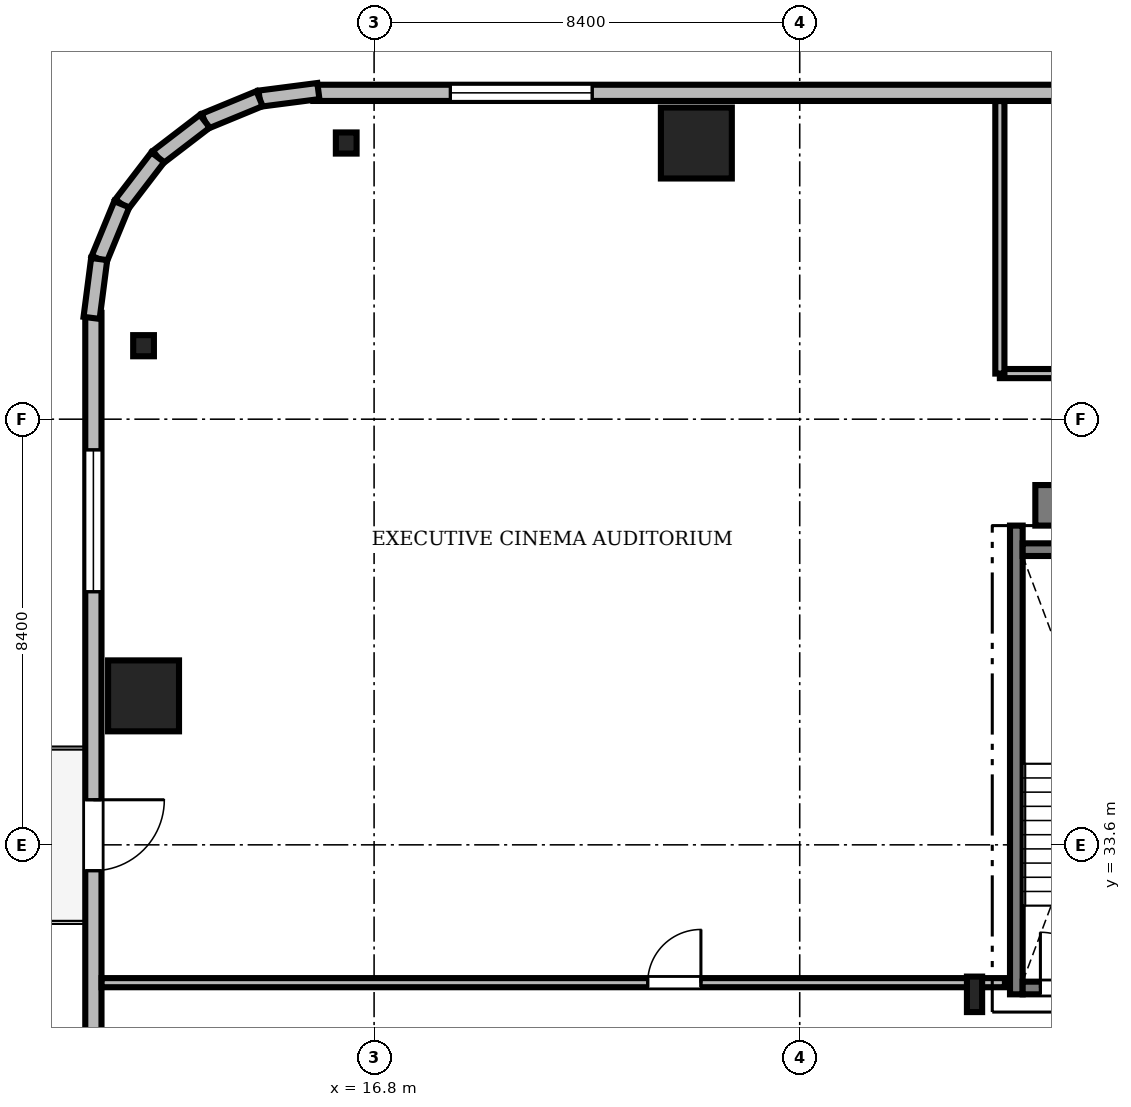
"""IFC4 building model, lengths in metres.
Left out: names, types, materials, properties, quantities, classifications, styles, units other than length and angle.
Written with IfcOpenShell. Run it as: python <this file> out.ifc"""

import sys

from ifc_helpers import new_model, si_unit, direction, frame, frame_2d, origin, origin_2d, place, context, subcontext, project, spatial, rectangle, i_section, extrude, source, transform, mapped, element, fill, save


model = new_model("IFC4")
c1 = context("Model", 3, precision=1e-05, world=origin(), true_north=direction((0.0, 1.0)))
c2 = subcontext(c1, "Body", "Model", "MODEL_VIEW")
j1 = project(units=[si_unit("LENGTHUNIT", "METRE"), si_unit("PLANEANGLEUNIT", "RADIAN")], contexts=[c1])
p1 = place(None, origin())
s1 = spatial("IfcSite", under=j1, at=p1, CompositionType="ELEMENT")
p2 = place(p1, origin())
s2 = spatial("IfcBuilding", under=s1, at=p2, CompositionType="ELEMENT")
p3 = place(p2, frame((0.0, 0.0, 181.0)))
s3 = spatial("IfcBuildingStorey", under=s2, at=p3, CompositionType="ELEMENT", Elevation=181.0)
m1 = source(origin(), c2, "Body", "SweptSolid", [
    extrude(rectangle(XDim=17.52, YDim=0.8, at=frame_2d((8.76, 0.0))), origin(), (0.0, 0.0, 1.0), 3.58),
])
p4 = place(p3, frame((29.85, 40.3, 0.0), z_axis=(0.0, 0.0, 1.0), x_axis=(1.0, 0.0, 0.0)))
e1 = element("IfcWall", 1, at=p4, inside=s3, PredefinedType="SHEAR", context=c2, shape_type="MappedRepresentation", body=[
    mapped(m1, transform((0.0, 0.0, 0.0), scale=1.0)),
])
m2 = source(origin(), c2, "Body", "SweptSolid", [
    extrude(i_section(OverallWidth=0.3, OverallDepth=0.7, WebThickness=0.017, FlangeThickness=0.032, FilletRadius=0.027, at=origin_2d()), origin(), (0.0, 0.0, 1.0), 3.58),
])
p5 = place(p3, frame((28.65, 30.65, 0.0), z_axis=(0.0, 0.0, 1.0), x_axis=(1.0, 0.0, 0.0)))
e2 = element("IfcColumn", 2, at=p5, inside=s3, PredefinedType="COLUMN", context=c2, shape_type="MappedRepresentation", body=[
    mapped(m2, transform((0.0, 0.0, 0.0), scale=1.0)),
])
m3 = source(origin(), c2, "Body", "SweptSolid", [
    extrude(rectangle(XDim=1.4, YDim=1.4, at=origin_2d()), origin(), (0.0, 0.0, 1.0), 3.58),
])
for number, where, z_axis, x_axis in (
    (3, (23.16, 47.45, 0.0), (0.0, 0.0, 1.0), (1.0, 0.0, 0.0)),
    (4, (12.25, 36.54, 0.0), (0.0, 0.0, 1.0), (1.0, 0.0, 0.0)),
):
    element("IfcColumn", number, at=place(p3, frame(where, z_axis=z_axis, x_axis=x_axis)), inside=s3, PredefinedType="COLUMN", context=c2, shape_type="MappedRepresentation", body=[
        mapped(m3, transform((0.0, 0.0, 0.0), scale=1.0)),
    ])
m4 = source(origin(), c2, "Body", "SweptSolid", [
    extrude(i_section(OverallWidth=0.409, OverallDepth=0.417, WebThickness=0.021, FlangeThickness=0.033, FilletRadius=0.015, at=origin_2d()), origin(), (0.0, 0.0, 1.0), 3.58),
])
for number, where, z_axis, x_axis in (
    (5, (16.25, 47.45, 0.0), (0.0, 0.0, 1.0), (1.0, 0.0, 0.0)),
    (6, (12.25, 43.45, 0.0), (0.0, 0.0, 1.0), (1.0, 0.0, 0.0)),
):
    element("IfcColumn", number, at=place(p3, frame(where, z_axis=z_axis, x_axis=x_axis)), inside=s3, PredefinedType="COLUMN", context=c2, shape_type="MappedRepresentation", body=[
        mapped(m4, transform((0.0, 0.0, 0.0), scale=1.0)),
    ])
m5 = source(origin(), c2, "Body", "SweptSolid", [
    extrude(rectangle(XDim=15.6, YDim=0.32, at=frame_2d((7.8, 0.0))), origin(), (0.0, 0.0, 1.0), 3.58),
])
p6 = place(p3, frame((31.2, 48.44, 0.0), z_axis=(0.0, 0.0, 1.0), x_axis=(-1.0, 0.0, 0.0)))
e7 = element("IfcWall", 7, at=p6, inside=s3, PredefinedType="SOLIDWALL", context=c2, shape_type="MappedRepresentation", body=[
    mapped(m5, transform((0.0, 0.0, 0.0), scale=1.0)),
])
m6 = source(origin(), c2, "Body", "SweptSolid", [
    extrude(rectangle(XDim=2.8, YDim=2.4, at=frame_2d((1.4, 1.2))), frame((0.0, 0.17, 0.0), z_axis=(0.0, -1.0, 0.0), x_axis=(1.0, 0.0, 0.0)), (0.0, 0.0, 1.0), 0.34),
])
p7 = place(p6, frame((10.095, 0.0, 0.72)))
e8 = element("IfcOpeningElement", 8, at=p7, cuts=e7, PredefinedType="OPENING", context=c2, shape_type="MappedRepresentation", body=[
    mapped(m6, transform((0.0, 0.0, 0.0), scale=1.0)),
])
m7 = source(origin(), c2, "Body", "SweptSolid", [
    extrude(rectangle(XDim=15.6, YDim=0.32, at=frame_2d((7.8, 0.0))), origin(), (0.0, 0.0, 1.0), 3.58),
])
p8 = place(p3, frame((11.26, 44.1, 0.0), z_axis=(0.0, 0.0, 1.0), x_axis=(0.0, -1.0, 0.0)))
e9 = element("IfcWall", 9, at=p8, inside=s3, PredefinedType="SOLIDWALL", context=c2, shape_type="MappedRepresentation", body=[
    mapped(m7, transform((0.0, 0.0, 0.0), scale=1.0)),
])
m8 = source(origin(), c2, "Body", "SweptSolid", [
    extrude(rectangle(XDim=1.4, YDim=2.3, at=frame_2d((0.7, 1.15))), frame((0.0, 0.17, 0.0), z_axis=(0.0, -1.0, 0.0), x_axis=(1.0, 0.0, 0.0)), (0.0, 0.0, 1.0), 0.34),
])
p9 = place(p8, frame((9.61, 0.0, 0.0)))
e10 = element("IfcOpeningElement", 10, at=p9, cuts=e9, PredefinedType="OPENING", context=c2, shape_type="MappedRepresentation", body=[
    mapped(m8, transform((0.0, 0.0, 0.0), scale=1.0)),
])
p10 = place(p8, frame((2.705, 0.0, 0.72)))
e11 = element("IfcOpeningElement", 11, at=p10, cuts=e9, PredefinedType="OPENING", context=c2, shape_type="MappedRepresentation", body=[
    mapped(m6, transform((0.0, 0.0, 0.0), scale=1.0)),
])
m9 = source(origin(), c2, "Body", "SweptSolid", [
    extrude(rectangle(XDim=1.17, YDim=0.32, at=frame_2d((0.585, 0.0))), origin(), (0.0, 0.0, 1.0), 3.58),
])
p11 = place(p3, frame((15.7, 48.476, 0.0), z_axis=(0.0, 0.0, 1.0), x_axis=(-0.991735963317, -0.128295670475, 0.0)))
e12 = element("IfcWall", 12, at=p11, inside=s3, PredefinedType="SOLIDWALL", context=c2, shape_type="MappedRepresentation", body=[
    mapped(m9, transform((0.0, 0.0, 0.0), scale=1.0)),
])
m10 = source(origin(), c2, "Body", "SweptSolid", [
    extrude(rectangle(XDim=1.169, YDim=0.32, at=frame_2d((0.584, 0.0))), origin(), (0.0, 0.0, 1.0), 3.58),
])
p12 = place(p3, frame((14.54, 48.325, 0.0), z_axis=(0.0, 0.0, 1.0), x_axis=(-0.924552646638, -0.381054331552, 0.0)))
e13 = element("IfcWall", 13, at=p12, inside=s3, PredefinedType="SOLIDWALL", context=c2, shape_type="MappedRepresentation", body=[
    mapped(m10, transform((0.0, 0.0, 0.0), scale=1.0)),
])
m11 = source(origin(), c2, "Body", "SweptSolid", [
    extrude(rectangle(XDim=1.169, YDim=0.32, at=frame_2d((0.584, 0.0))), origin(), (0.0, 0.0, 1.0), 3.58),
])
p13 = place(p3, frame((13.459, 47.88, 0.0), z_axis=(0.0, 0.0, 1.0), x_axis=(-0.793663520347, -0.608356981114, 0.0)))
e14 = element("IfcWall", 14, at=p13, inside=s3, PredefinedType="SOLIDWALL", context=c2, shape_type="MappedRepresentation", body=[
    mapped(m11, transform((0.0, 0.0, 0.0), scale=1.0)),
])
m12 = source(origin(), c2, "Body", "SweptSolid", [
    extrude(rectangle(XDim=1.169, YDim=0.32, at=frame_2d((0.584, 0.0))), origin(), (0.0, 0.0, 1.0), 3.58),
])
p14 = place(p3, frame((12.531, 47.169, 0.0), z_axis=(0.0, 0.0, 1.0), x_axis=(-0.608387696831, -0.793639975269, 0.0)))
e15 = element("IfcWall", 15, at=p14, inside=s3, PredefinedType="SOLIDWALL", context=c2, shape_type="MappedRepresentation", body=[
    mapped(m12, transform((0.0, 0.0, 0.0), scale=1.0)),
])
p15 = place(p3, frame((11.82, 46.241, 0.0), z_axis=(0.0, 0.0, 1.0), x_axis=(-0.381054331552, -0.924552646638, 0.0)))
e16 = element("IfcWall", 16, at=p15, inside=s3, PredefinedType="SOLIDWALL", context=c2, shape_type="MappedRepresentation", body=[
    mapped(m10, transform((0.0, 0.0, 0.0), scale=1.0)),
])
p16 = place(p3, frame((11.375, 45.16, 0.0), z_axis=(0.0, 0.0, 1.0), x_axis=(-0.128295670475, -0.991735963317, 0.0)))
e17 = element("IfcWall", 17, at=p16, inside=s3, PredefinedType="SOLIDWALL", context=c2, shape_type="MappedRepresentation", body=[
    mapped(m9, transform((0.0, 0.0, 0.0), scale=1.0)),
])
m13 = source(origin(), c2, "Body", "SweptSolid", [
    extrude(rectangle(XDim=9.25, YDim=0.25, at=frame_2d((4.625, 0.0))), origin(), (0.0, 0.0, 1.0), 3.6),
])
p17 = place(p3, frame((29.475, 30.65, 0.0), z_axis=(0.0, 0.0, 1.0), x_axis=(0.0, 1.0, 0.0)))
e18 = element("IfcWall", 18, at=p17, inside=s3, PredefinedType="SOLIDWALL", context=c2, shape_type="MappedRepresentation", body=[
    mapped(m13, transform((0.0, 0.0, 0.0), scale=1.0)),
])
m14 = source(origin(), c2, "Body", "SweptSolid", [
    extrude(rectangle(XDim=3.15, YDim=0.25, at=frame_2d((1.575, 0.0))), origin(), (0.0, 0.0, 1.0), 3.6),
])
p18 = place(p3, frame((29.6, 39.425, 0.0), z_axis=(0.0, 0.0, 1.0), x_axis=(1.0, 0.0, 0.0)))
e19 = element("IfcWall", 19, at=p18, inside=s3, PredefinedType="SOLIDWALL", context=c2, shape_type="MappedRepresentation", body=[
    mapped(m14, transform((0.0, 0.0, 0.0), scale=1.0)),
])
p19 = place(p3, frame((29.6, 30.775, 0.0), z_axis=(0.0, 0.0, 1.0), x_axis=(1.0, 0.0, 0.0)))
e20 = element("IfcWall", 20, at=p19, inside=s3, PredefinedType="SOLIDWALL", context=c2, shape_type="MappedRepresentation", body=[
    mapped(m14, transform((0.0, 0.0, 0.0), scale=1.0)),
])
m15 = source(origin(), c2, "Body", "SweptSolid", [
    extrude(rectangle(XDim=1.1, YDim=2.2, at=frame_2d((0.55, 1.1))), frame((0.0, 0.135, 0.0), z_axis=(0.0, -1.0, 0.0), x_axis=(1.0, 0.0, 0.0)), (0.0, 0.0, 1.0), 0.27),
])
p20 = place(p19, frame((0.35, 0.0, 0.0)))
e21 = element("IfcOpeningElement", 21, at=p20, cuts=e20, PredefinedType="OPENING", context=c2, shape_type="MappedRepresentation", body=[
    mapped(m15, transform((0.0, 0.0, 0.0), scale=1.0)),
])
m16 = source(origin(), c2, "Body", "SweptSolid", [
    extrude(rectangle(XDim=28.428, YDim=0.18, at=frame_2d((14.214, 0.0))), origin(), (0.0, 0.0, 1.0), 2.822),
])
p21 = place(p3, frame((29.15, 42.9, 0.0), z_axis=(0.0, 0.0, 1.0), x_axis=(1.0, 0.0, 0.0)))
e22 = element("IfcWall", 22, at=p21, inside=s3, PredefinedType="PARTITIONING", context=c2, shape_type="MappedRepresentation", body=[
    mapped(m16, transform((0.0, 0.0, 0.0), scale=1.0)),
])
m17 = source(origin(), c2, "Body", "SweptSolid", [
    extrude(rectangle(XDim=1.05, YDim=2.2, at=frame_2d((0.525, 1.1))), frame((0.0, 0.1, 0.0), z_axis=(0.0, -1.0, 0.0), x_axis=(1.0, 0.0, 0.0)), (0.0, 0.0, 1.0), 0.2),
])
p22 = place(p21, frame((4.5, 0.0, 0.0)))
e23 = element("IfcOpeningElement", 23, at=p22, cuts=e22, PredefinedType="OPENING", context=c2, shape_type="MappedRepresentation", body=[
    mapped(m17, transform((0.0, 0.0, 0.0), scale=1.0)),
])
m18 = source(origin(), c2, "Body", "SweptSolid", [
    extrude(rectangle(XDim=17.828, YDim=0.18, at=frame_2d((8.914, 0.0))), origin(), (0.0, 0.0, 1.0), 2.822),
])
p23 = place(p3, frame((11.422, 30.88, 0.0), z_axis=(0.0, 0.0, 1.0), x_axis=(1.0, 0.0, 0.0)))
e24 = element("IfcWall", 24, at=p23, inside=s3, PredefinedType="PARTITIONING", context=c2, shape_type="MappedRepresentation", body=[
    mapped(m18, transform((0.0, 0.0, 0.0), scale=1.0)),
])
p24 = place(p23, frame((10.778, 0.0, 0.0)))
e25 = element("IfcOpeningElement", 25, at=p24, cuts=e24, PredefinedType="OPENING", context=c2, shape_type="MappedRepresentation", body=[
    mapped(m17, transform((0.0, 0.0, 0.0), scale=1.0)),
])
m19 = source(origin(), c2, "Body", "SweptSolid", [
    extrude(rectangle(XDim=5.378, YDim=0.18, at=frame_2d((2.689, 0.0))), origin(), (0.0, 0.0, 1.0), 2.822),
])
p25 = place(p3, frame((29.15, 42.9, 0.0), z_axis=(0.0, 0.0, 1.0), x_axis=(0.0, 1.0, 0.0)))
e26 = element("IfcWall", 26, at=p25, inside=s3, PredefinedType="PARTITIONING", context=c2, shape_type="MappedRepresentation", body=[
    mapped(m19, transform((0.0, 0.0, 0.0), scale=1.0)),
])
m20 = source(origin(), c2, "Body", "SweptSolid", [
    extrude(rectangle(XDim=2.8, YDim=2.4, at=frame_2d((1.4, 1.2))), frame((0.0, 0.03, 0.0), z_axis=(0.0, -1.0, 0.0), x_axis=(1.0, 0.0, 0.0)), (0.0, 0.0, 1.0), 0.06),
])
p26 = place(p7, origin())
e27 = element("IfcWindow", 27, at=p26, inside=s3, PartitioningType="SINGLE_PANEL", PredefinedType="WINDOW", context=c2, shape_type="MappedRepresentation", body=[
    mapped(m20, transform((0.0, 0.0, 0.0), scale=1.0)),
])
fill(e8, e27)
m21 = source(origin(), c2, "Body", "SweptSolid", [
    extrude(rectangle(XDim=1.4, YDim=2.3, at=frame_2d((0.7, 1.15))), frame((0.0, 0.025, 0.0), z_axis=(0.0, -1.0, 0.0), x_axis=(1.0, 0.0, 0.0)), (0.0, 0.0, 1.0), 0.05),
])
p27 = place(p9, frame((1.4, 0.0, 0.0), z_axis=(0.0, 0.0, 1.0), x_axis=(-1.0, 0.0, 0.0)))
e28 = element("IfcDoor", 28, at=p27, inside=s3, OperationType="DOUBLE_DOOR_SLIDING", PredefinedType="DOOR", context=c2, shape_type="MappedRepresentation", body=[
    mapped(m21, transform((0.0, 0.0, 0.0), scale=1.0)),
])
fill(e10, e28)
p28 = place(p10, origin())
e29 = element("IfcWindow", 29, at=p28, inside=s3, PartitioningType="SINGLE_PANEL", PredefinedType="WINDOW", context=c2, shape_type="MappedRepresentation", body=[
    mapped(m20, transform((0.0, 0.0, 0.0), scale=1.0)),
])
fill(e11, e29)
m22 = source(origin(), c2, "Body", "SweptSolid", [
    extrude(rectangle(XDim=1.1, YDim=2.2, at=frame_2d((0.55, 1.1))), frame((0.0, 0.025, 0.0), z_axis=(0.0, -1.0, 0.0), x_axis=(1.0, 0.0, 0.0)), (0.0, 0.0, 1.0), 0.05),
])
p29 = place(p20, origin())
e30 = element("IfcDoor", 30, at=p29, inside=s3, OperationType="SINGLE_SWING_LEFT", PredefinedType="DOOR", context=c2, shape_type="MappedRepresentation", body=[
    mapped(m22, transform((0.0, 0.0, 0.0), scale=1.0)),
])
fill(e21, e30)
m23 = source(origin(), c2, "Body", "SweptSolid", [
    extrude(rectangle(XDim=1.05, YDim=2.2, at=frame_2d((0.525, 1.1))), frame((0.0, 0.025, 0.0), z_axis=(0.0, -1.0, 0.0), x_axis=(1.0, 0.0, 0.0)), (0.0, 0.0, 1.0), 0.05),
])
p30 = place(p24, origin())
e31 = element("IfcDoor", 31, at=p30, inside=s3, OperationType="SINGLE_SWING_RIGHT", PredefinedType="DOOR", context=c2, shape_type="MappedRepresentation", body=[
    mapped(m23, transform((0.0, 0.0, 0.0), scale=1.0)),
])
fill(e25, e31)
save(model, sys.argv[1])
